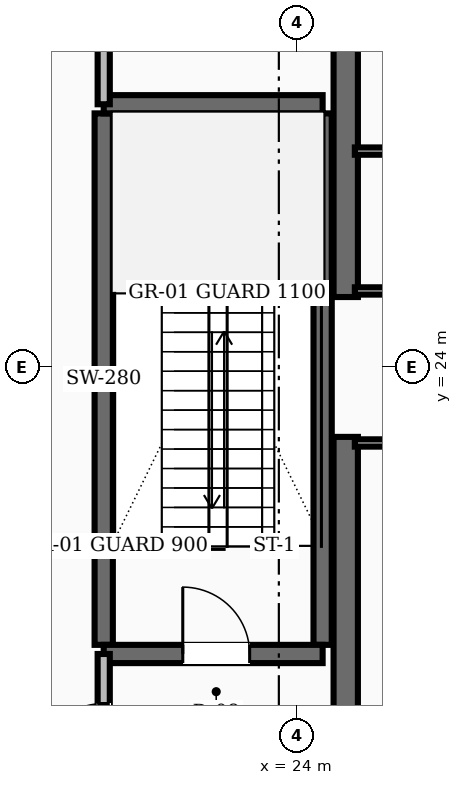
"""IFC4 building model, lengths in metres.
Left out: names, types, materials, properties, quantities, classifications, styles, units other than length and angle.
Written with IfcOpenShell. Run it as: python <this file> out.ifc"""

import sys

from ifc_helpers import new_model, si_unit, direction, frame, frame_2d, origin, place, context, subcontext, project, spatial, rectangle, extrude, element, fill, save


model = new_model("IFC4")
c1 = context("Model", 3, precision=1e-05, world=origin(), true_north=direction((0.0, 1.0)))
c2 = subcontext(c1, "Body", "Model", "MODEL_VIEW")
j1 = project(units=[si_unit("LENGTHUNIT", "METRE"), si_unit("PLANEANGLEUNIT", "RADIAN")], contexts=[c1])
p1 = place(None, origin())
s1 = spatial("IfcSite", under=j1, at=p1, CompositionType="ELEMENT")
p2 = place(p1, origin())
s2 = spatial("IfcBuilding", under=s1, at=p2, CompositionType="ELEMENT")
p3 = place(p2, frame((0.0, 0.0, 19.6)))
s3 = spatial("IfcBuildingStorey", under=s2, at=p3, CompositionType="ELEMENT", Elevation=19.6)
for number, where, z_axis, x_axis in (
    (1, (24.8, 16.55, 0.0), (0.0, 0.0, 1.0), (0.0, 1.0, 0.0)),
    (2, (24.8, 25.15, 0.0), (0.0, 0.0, 1.0), (0.0, 1.0, 0.0)),
):
    element("IfcWall", number, at=place(p3, frame(where, z_axis=z_axis, x_axis=x_axis)), inside=s3, PredefinedType="SHEAR", context=c2, shape_type="SweptSolid", body=[
        extrude(rectangle(XDim=6.3, YDim=0.4, at=frame_2d((3.15, 0.0))), origin(), (0.0, 0.0, 1.0), 4.8),
    ])
for number, where, z_axis, x_axis in (
    (3, (20.82, 19.43, 0.0), (0.0, 0.0, 1.0), (0.0, 1.0, 0.0)),
    (4, (24.42, 19.43, 0.0), (0.0, 0.0, 1.0), (0.0, 1.0, 0.0)),
):
    element("IfcWall", number, at=place(p3, frame(where, z_axis=z_axis, x_axis=x_axis)), inside=s3, PredefinedType="SHEAR", context=c2, shape_type="SweptSolid", body=[
        extrude(rectangle(XDim=8.74, YDim=0.3, at=frame_2d((4.37, 0.0))), origin(), (0.0, 0.0, 1.0), 4.8),
    ])
p4 = place(p3, frame((20.82, 19.28, 0.0), z_axis=(0.0, 0.0, 1.0), x_axis=(1.0, 0.0, 0.0)))
e5 = element("IfcWall", 5, at=p4, inside=s3, PredefinedType="SHEAR", context=c2, shape_type="SweptSolid", body=[
    extrude(rectangle(XDim=3.6, YDim=0.3, at=frame_2d((1.8, 0.0))), origin(), (0.0, 0.0, 1.0), 4.8),
])
p5 = place(p4, frame((1.3, 0.0, 0.0)))
e6 = element("IfcOpeningElement", 6, at=p5, cuts=e5, PredefinedType="OPENING", context=c2, shape_type="SweptSolid", body=[
    extrude(rectangle(XDim=1.1, YDim=2.1, at=frame_2d((0.55, 1.05))), frame((0.0, 0.16, 0.0), z_axis=(0.0, -1.0, 0.0), x_axis=(1.0, 0.0, 0.0)), (0.0, 0.0, 1.0), 0.32),
])
p6 = place(p3, frame((20.82, 28.32, 0.0), z_axis=(0.0, 0.0, 1.0), x_axis=(1.0, 0.0, 0.0)))
e7 = element("IfcWall", 7, at=p6, inside=s3, PredefinedType="SHEAR", context=c2, shape_type="SweptSolid", body=[
    extrude(rectangle(XDim=3.6, YDim=0.3, at=frame_2d((1.8, 0.0))), origin(), (0.0, 0.0, 1.0), 4.8),
])
p7 = place(p3, frame((20.82, 16.55, 0.0), z_axis=(0.0, 0.0, 1.0), x_axis=(0.0, 1.0, 0.0)))
e8 = element("IfcWall", 8, at=p7, inside=s3, PredefinedType="SOLIDWALL", context=c2, shape_type="SweptSolid", body=[
    extrude(rectangle(XDim=2.73, YDim=0.2, at=frame_2d((1.365, 0.0))), origin(), (0.0, 0.0, 1.0), 3.42),
])
p8 = place(p7, frame((0.815, 0.0, 0.0)))
e9 = element("IfcOpeningElement", 9, at=p8, cuts=e8, PredefinedType="OPENING", context=c2, shape_type="SweptSolid", body=[
    extrude(rectangle(XDim=1.1, YDim=2.1, at=frame_2d((0.55, 1.05))), frame((0.0, 0.11, 0.0), z_axis=(0.0, -1.0, 0.0), x_axis=(1.0, 0.0, 0.0)), (0.0, 0.0, 1.0), 0.22),
])
p9 = place(p3, frame((20.82, 28.32, 0.0), z_axis=(0.0, 0.0, 1.0), x_axis=(0.0, 1.0, 0.0)))
e10 = element("IfcWall", 10, at=p9, inside=s3, PredefinedType="SOLIDWALL", context=c2, shape_type="SweptSolid", body=[
    extrude(rectangle(XDim=3.13, YDim=0.2, at=frame_2d((1.565, 0.0))), origin(), (0.0, 0.0, 1.0), 3.42),
])
p10 = place(p9, frame((1.09, 0.0, 0.0)))
e11 = element("IfcOpeningElement", 11, at=p10, cuts=e10, PredefinedType="OPENING", context=c2, shape_type="SweptSolid", body=[
    extrude(rectangle(XDim=0.95, YDim=2.1, at=frame_2d((0.475, 1.05))), frame((0.0, 0.11, 0.0), z_axis=(0.0, -1.0, 0.0), x_axis=(1.0, 0.0, 0.0)), (0.0, 0.0, 1.0), 0.22),
])
p11 = place(p3, frame((24.95, 25.25, 0.0), z_axis=(0.0, 0.0, 1.0), x_axis=(1.0, 0.0, 0.0)))
e12 = element("IfcWall", 12, at=p11, inside=s3, PredefinedType="PARTITIONING", context=c2, shape_type="SweptSolid", body=[
    extrude(rectangle(XDim=3.2, YDim=0.12, at=frame_2d((1.6, 0.0))), origin(), (0.0, 0.0, 1.0), 3.42),
])
p12 = place(p11, frame((1.125, 0.0, 0.0)))
e13 = element("IfcOpeningElement", 13, at=p12, cuts=e12, PredefinedType="OPENING", context=c2, shape_type="SweptSolid", body=[
    extrude(rectangle(XDim=0.95, YDim=2.1, at=frame_2d((0.475, 1.05))), frame((0.0, 0.07, 0.0), z_axis=(0.0, -1.0, 0.0), x_axis=(1.0, 0.0, 0.0)), (0.0, 0.0, 1.0), 0.14),
])
p13 = place(p3, frame((24.95, 22.75, 0.0), z_axis=(0.0, 0.0, 1.0), x_axis=(1.0, 0.0, 0.0)))
e14 = element("IfcWall", 14, at=p13, inside=s3, PredefinedType="PARTITIONING", context=c2, shape_type="SweptSolid", body=[
    extrude(rectangle(XDim=3.2, YDim=0.12, at=frame_2d((1.6, 0.0))), origin(), (0.0, 0.0, 1.0), 3.42),
])
p14 = place(p13, frame((1.125, 0.0, 0.0)))
e15 = element("IfcOpeningElement", 15, at=p14, cuts=e14, PredefinedType="OPENING", context=c2, shape_type="SweptSolid", body=[
    extrude(rectangle(XDim=0.95, YDim=2.1, at=frame_2d((0.475, 1.05))), frame((0.0, 0.07, 0.0), z_axis=(0.0, -1.0, 0.0), x_axis=(1.0, 0.0, 0.0)), (0.0, 0.0, 1.0), 0.14),
])
p15 = place(p3, frame((24.95, 27.55, 0.0), z_axis=(0.0, 0.0, 1.0), x_axis=(1.0, 0.0, 0.0)))
e16 = element("IfcWall", 16, at=p15, inside=s3, PredefinedType="PARTITIONING", context=c2, shape_type="SweptSolid", body=[
    extrude(rectangle(XDim=3.2, YDim=0.12, at=frame_2d((1.6, 0.0))), origin(), (0.0, 0.0, 1.0), 3.42),
])
p16 = place(p15, frame((1.125, 0.0, 0.0)))
e17 = element("IfcOpeningElement", 17, at=p16, cuts=e16, PredefinedType="OPENING", context=c2, shape_type="SweptSolid", body=[
    extrude(rectangle(XDim=0.95, YDim=2.1, at=frame_2d((0.475, 1.05))), frame((0.0, 0.07, 0.0), z_axis=(0.0, -1.0, 0.0), x_axis=(1.0, 0.0, 0.0)), (0.0, 0.0, 1.0), 0.14),
])
p17 = place(p5, origin())
e18 = element("IfcDoor", 18, at=p17, inside=s3, OperationType="SINGLE_SWING_LEFT", PredefinedType="DOOR", context=c2, shape_type="SweptSolid", body=[
    extrude(rectangle(XDim=1.1, YDim=2.1, at=frame_2d((0.55, 1.05))), frame((0.0, 0.025, 0.0), z_axis=(0.0, -1.0, 0.0), x_axis=(1.0, 0.0, 0.0)), (0.0, 0.0, 1.0), 0.05),
])
fill(e6, e18)
p18 = place(p8, origin())
e19 = element("IfcDoor", 19, at=p18, inside=s3, OperationType="SINGLE_SWING_LEFT", PredefinedType="DOOR", context=c2, shape_type="SweptSolid", body=[
    extrude(rectangle(XDim=1.1, YDim=2.1, at=frame_2d((0.55, 1.05))), frame((0.0, 0.025, 0.0), z_axis=(0.0, -1.0, 0.0), x_axis=(1.0, 0.0, 0.0)), (0.0, 0.0, 1.0), 0.05),
])
fill(e9, e19)
save(model, sys.argv[1])
